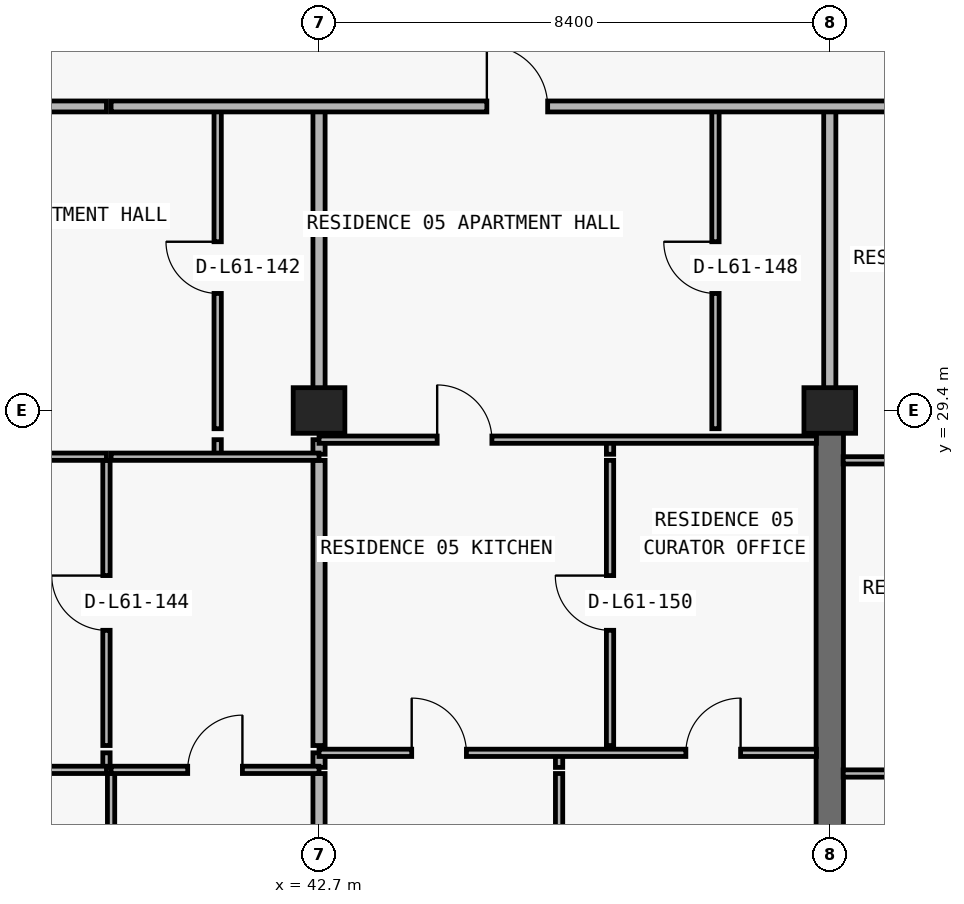
"""IFC4 building model, lengths in metres.
Left out: names, types, materials, properties, quantities, classifications, styles, units other than length and angle.
Written with IfcOpenShell. Run it as: python <this file> out.ifc"""

import sys

from ifc_helpers import new_model, si_unit, direction, frame, frame_2d, origin, origin_2d, place, context, subcontext, project, spatial, rectangle, extrude, element, fill, save


model = new_model("IFC4")
c1 = context("Model", 3, precision=1e-05, world=origin(), true_north=direction((0.0, 1.0)))
c2 = subcontext(c1, "Body", "Model", "MODEL_VIEW")
j1 = project(units=[si_unit("LENGTHUNIT", "METRE"), si_unit("PLANEANGLEUNIT", "RADIAN")], contexts=[c1])
p1 = place(None, origin())
s1 = spatial("IfcSite", under=j1, at=p1, CompositionType="ELEMENT")
p2 = place(p1, origin())
s2 = spatial("IfcBuilding", under=s1, at=p2, CompositionType="ELEMENT")
p3 = place(p2, frame((0.0, 0.0, 218.1)))
s3 = spatial("IfcBuildingStorey", under=s2, at=p3, CompositionType="ELEMENT", Elevation=218.1)
for number, where, z_axis, x_axis in (
    (1, (42.7, 29.4, 0.0), (0.0, 0.0, 1.0), (1.0, 0.0, 0.0)),
    (2, (51.1, 29.4, 0.0), (0.0, 0.0, 1.0), (1.0, 0.0, 0.0)),
):
    element("IfcColumn", number, at=place(p3, frame(where, z_axis=z_axis, x_axis=x_axis)), inside=s3, PredefinedType="COLUMN", context=c2, shape_type="SweptSolid", body=[
        extrude(rectangle(XDim=0.85, YDim=0.75, at=origin_2d()), origin(), (0.0, 0.0, 1.0), 3.0),
    ])
p4 = place(p3, frame((51.1, 20.8, 0.0), z_axis=(0.0, 0.0, 1.0), x_axis=(0.0, 1.0, 0.0)))
e3 = element("IfcWall", 3, at=p4, inside=s3, PredefinedType="SHEAR", context=c2, shape_type="SweptSolid", body=[
    extrude(rectangle(XDim=8.6, YDim=0.45, at=frame_2d((4.3, 0.0))), origin(), (0.0, 0.0, 1.0), 3.0),
])
p5 = place(p3, frame((39.204, 23.53, 0.0), z_axis=(0.0, 0.0, 1.0), x_axis=(0.0, 1.0, 0.0)))
e4 = element("IfcWall", 4, at=p5, inside=s3, PredefinedType="PARTITIONING", context=c2, shape_type="SweptSolid", body=[
    extrude(rectangle(XDim=0.24, YDim=0.12, at=frame_2d((0.12, 0.0))), origin(), (0.0, 0.0, 1.0), 3.0),
])
p6 = place(p3, frame((39.204, 23.89, 0.0), z_axis=(0.0, 0.0, 1.0), x_axis=(0.0, 1.0, 0.0)))
e5 = element("IfcWall", 5, at=p6, inside=s3, PredefinedType="PARTITIONING", context=c2, shape_type="SweptSolid", body=[
    extrude(rectangle(XDim=4.69, YDim=0.12, at=frame_2d((2.345, 0.0))), origin(), (0.0, 0.0, 1.0), 3.0),
])
p7 = place(p6, frame((1.895, 0.0, 0.0)))
e6 = element("IfcOpeningElement", 6, at=p7, cuts=e5, PredefinedType="OPENING", context=c2, shape_type="SweptSolid", body=[
    extrude(rectangle(XDim=0.9, YDim=2.15, at=frame_2d((0.45, 1.075))), frame((0.0, 0.07, 0.0), z_axis=(0.0, -1.0, 0.0), x_axis=(1.0, 0.0, 0.0)), (0.0, 0.0, 1.0), 0.14),
])
p8 = place(p3, frame((39.28, 11.24, 0.0), z_axis=(0.0, 0.0, 1.0), x_axis=(0.0, 1.0, 0.0)))
e7 = element("IfcWall", 7, at=p8, inside=s3, PredefinedType="PARTITIONING", context=c2, shape_type="SweptSolid", body=[
    extrude(rectangle(XDim=12.19, YDim=0.12, at=frame_2d((6.095, 0.0))), origin(), (0.0, 0.0, 1.0), 3.0),
])
p9 = place(p3, frame((41.033, 28.68, 0.0), z_axis=(0.0, 0.0, 1.0), x_axis=(0.0, 1.0, 0.0)))
e8 = element("IfcWall", 8, at=p9, inside=s3, PredefinedType="PARTITIONING", context=c2, shape_type="SweptSolid", body=[
    extrude(rectangle(XDim=0.24, YDim=0.12, at=frame_2d((0.12, 0.0))), origin(), (0.0, 0.0, 1.0), 2.675),
])
p10 = place(p3, frame((41.033, 29.1, 0.0), z_axis=(0.0, 0.0, 1.0), x_axis=(0.0, 1.0, 0.0)))
e9 = element("IfcWall", 9, at=p10, inside=s3, PredefinedType="PARTITIONING", context=c2, shape_type="SweptSolid", body=[
    extrude(rectangle(XDim=5.3, YDim=0.12, at=frame_2d((2.65, 0.0))), origin(), (0.0, 0.0, 1.0), 2.675),
])
p11 = place(p10, frame((2.225, 0.0, 0.0)))
e10 = element("IfcOpeningElement", 10, at=p11, cuts=e9, PredefinedType="OPENING", context=c2, shape_type="SweptSolid", body=[
    extrude(rectangle(XDim=0.85, YDim=2.1, at=frame_2d((0.425, 1.05))), frame((0.0, 0.07, 0.0), z_axis=(0.0, -1.0, 0.0), x_axis=(1.0, 0.0, 0.0)), (0.0, 0.0, 1.0), 0.14),
])
p12 = place(p3, frame((42.7, 11.24, 0.0), z_axis=(0.0, 0.0, 1.0), x_axis=(0.0, 1.0, 0.0)))
e11 = element("IfcWall", 11, at=p12, inside=s3, PredefinedType="PARTITIONING", context=c2, shape_type="SweptSolid", body=[
    extrude(rectangle(XDim=12.19, YDim=0.2, at=frame_2d((6.095, 0.0))), origin(), (0.0, 0.0, 1.0), 2.213),
])
p13 = place(p3, frame((42.7, 23.53, 0.0), z_axis=(0.0, 0.0, 1.0), x_axis=(0.0, 1.0, 0.0)))
e12 = element("IfcWall", 12, at=p13, inside=s3, PredefinedType="PARTITIONING", context=c2, shape_type="SweptSolid", body=[
    extrude(rectangle(XDim=0.24, YDim=0.2, at=frame_2d((0.12, 0.0))), origin(), (0.0, 0.0, 1.0), 2.213),
])
p14 = place(p3, frame((42.7, 23.89, 0.0), z_axis=(0.0, 0.0, 1.0), x_axis=(0.0, 1.0, 0.0)))
e13 = element("IfcWall", 13, at=p14, inside=s3, PredefinedType="PARTITIONING", context=c2, shape_type="SweptSolid", body=[
    extrude(rectangle(XDim=4.69, YDim=0.2, at=frame_2d((2.345, 0.0))), origin(), (0.0, 0.0, 1.0), 2.213),
])
p15 = place(p3, frame((42.7, 28.68, 0.0), z_axis=(0.0, 0.0, 1.0), x_axis=(0.0, 1.0, 0.0)))
e14 = element("IfcWall", 14, at=p15, inside=s3, PredefinedType="PARTITIONING", context=c2, shape_type="SweptSolid", body=[
    extrude(rectangle(XDim=0.24, YDim=0.2, at=frame_2d((0.12, 0.0))), origin(), (0.0, 0.0, 1.0), 2.213),
])
p16 = place(p3, frame((42.7, 29.1, 0.0), z_axis=(0.0, 0.0, 1.0), x_axis=(0.0, 1.0, 0.0)))
e15 = element("IfcWall", 15, at=p16, inside=s3, PredefinedType="PARTITIONING", context=c2, shape_type="SweptSolid", body=[
    extrude(rectangle(XDim=5.3, YDim=0.2, at=frame_2d((2.65, 0.0))), origin(), (0.0, 0.0, 1.0), 2.213),
])
p17 = place(p3, frame((46.648, 11.24, 0.0), z_axis=(0.0, 0.0, 1.0), x_axis=(0.0, 1.0, 0.0)))
e16 = element("IfcWall", 16, at=p17, inside=s3, PredefinedType="PARTITIONING", context=c2, shape_type="SweptSolid", body=[
    extrude(rectangle(XDim=12.19, YDim=0.12, at=frame_2d((6.095, 0.0))), origin(), (0.0, 0.0, 1.0), 3.0),
])
p18 = place(p3, frame((46.648, 23.53, 0.0), z_axis=(0.0, 0.0, 1.0), x_axis=(0.0, 1.0, 0.0)))
e17 = element("IfcWall", 17, at=p18, inside=s3, PredefinedType="PARTITIONING", context=c2, shape_type="SweptSolid", body=[
    extrude(rectangle(XDim=0.24, YDim=0.12, at=frame_2d((0.12, 0.0))), origin(), (0.0, 0.0, 1.0), 3.0),
])
p19 = place(p3, frame((47.486, 23.89, 0.0), z_axis=(0.0, 0.0, 1.0), x_axis=(0.0, 1.0, 0.0)))
e18 = element("IfcWall", 18, at=p19, inside=s3, PredefinedType="PARTITIONING", context=c2, shape_type="SweptSolid", body=[
    extrude(rectangle(XDim=4.69, YDim=0.12, at=frame_2d((2.345, 0.0))), origin(), (0.0, 0.0, 1.0), 3.0),
])
p20 = place(p19, frame((1.895, 0.0, 0.0)))
e19 = element("IfcOpeningElement", 19, at=p20, cuts=e18, PredefinedType="OPENING", context=c2, shape_type="SweptSolid", body=[
    extrude(rectangle(XDim=0.9, YDim=2.15, at=frame_2d((0.45, 1.075))), frame((0.0, 0.07, 0.0), z_axis=(0.0, -1.0, 0.0), x_axis=(1.0, 0.0, 0.0)), (0.0, 0.0, 1.0), 0.14),
])
p21 = place(p3, frame((47.486, 28.68, 0.0), z_axis=(0.0, 0.0, 1.0), x_axis=(0.0, 1.0, 0.0)))
e20 = element("IfcWall", 20, at=p21, inside=s3, PredefinedType="PARTITIONING", context=c2, shape_type="SweptSolid", body=[
    extrude(rectangle(XDim=0.24, YDim=0.12, at=frame_2d((0.12, 0.0))), origin(), (0.0, 0.0, 1.0), 3.0),
])
p22 = place(p3, frame((49.22, 29.1, 0.0), z_axis=(0.0, 0.0, 1.0), x_axis=(0.0, 1.0, 0.0)))
e21 = element("IfcWall", 21, at=p22, inside=s3, PredefinedType="PARTITIONING", context=c2, shape_type="SweptSolid", body=[
    extrude(rectangle(XDim=5.3, YDim=0.12, at=frame_2d((2.65, 0.0))), origin(), (0.0, 0.0, 1.0), 2.675),
])
p23 = place(p22, frame((2.225, 0.0, 0.0)))
e22 = element("IfcOpeningElement", 22, at=p23, cuts=e21, PredefinedType="OPENING", context=c2, shape_type="SweptSolid", body=[
    extrude(rectangle(XDim=0.85, YDim=2.1, at=frame_2d((0.425, 1.05))), frame((0.0, 0.07, 0.0), z_axis=(0.0, -1.0, 0.0), x_axis=(1.0, 0.0, 0.0)), (0.0, 0.0, 1.0), 0.14),
])
p24 = place(p3, frame((51.1, 29.405, 0.0), z_axis=(0.0, 0.0, 1.0), x_axis=(0.0, 1.0, 0.0)))
e23 = element("IfcWall", 23, at=p24, inside=s3, PredefinedType="PARTITIONING", context=c2, shape_type="SweptSolid", body=[
    extrude(rectangle(XDim=4.995, YDim=0.2, at=frame_2d((2.498, 0.0))), origin(), (0.0, 0.0, 1.0), 2.285),
])
p25 = place(p3, frame((51.32, 23.43, 0.0), z_axis=(0.0, 0.0, 1.0), x_axis=(1.0, 0.0, 0.0)))
e24 = element("IfcWall", 24, at=p25, inside=s3, PredefinedType="PARTITIONING", context=c2, shape_type="SweptSolid", body=[
    extrude(rectangle(XDim=8.18, YDim=0.12, at=frame_2d((4.09, 0.0))), origin(), (0.0, 0.0, 1.0), 3.0),
])
p26 = place(p25, frame((1.583, 0.0, 0.0)))
e25 = element("IfcOpeningElement", 25, at=p26, cuts=e24, PredefinedType="OPENING", context=c2, shape_type="SweptSolid", body=[
    extrude(rectangle(XDim=0.9, YDim=2.15, at=frame_2d((0.45, 1.075))), frame((0.0, 0.07, 0.0), z_axis=(0.0, -1.0, 0.0), x_axis=(1.0, 0.0, 0.0)), (0.0, 0.0, 1.0), 0.14),
])
p27 = place(p25, frame((5.84, 0.0, 0.0)))
e26 = element("IfcOpeningElement", 26, at=p27, cuts=e24, PredefinedType="OPENING", context=c2, shape_type="SweptSolid", body=[
    extrude(rectangle(XDim=0.9, YDim=2.15, at=frame_2d((0.45, 1.075))), frame((0.0, 0.07, 0.0), z_axis=(0.0, -1.0, 0.0), x_axis=(1.0, 0.0, 0.0)), (0.0, 0.0, 1.0), 0.14),
])
p28 = place(p3, frame((35.1, 23.49, 0.0), z_axis=(0.0, 0.0, 1.0), x_axis=(1.0, 0.0, 0.0)))
e27 = element("IfcWall", 27, at=p28, inside=s3, PredefinedType="PARTITIONING", context=c2, shape_type="SweptSolid", body=[
    extrude(rectangle(XDim=4.104, YDim=0.12, at=frame_2d((2.052, 0.0))), origin(), (0.0, 0.0, 1.0), 3.0),
])
p29 = place(p28, frame((1.602, 0.0, 0.0)))
e28 = element("IfcOpeningElement", 28, at=p29, cuts=e27, PredefinedType="OPENING", context=c2, shape_type="SweptSolid", body=[
    extrude(rectangle(XDim=0.9, YDim=2.15, at=frame_2d((0.45, 1.075))), frame((0.0, 0.07, 0.0), z_axis=(0.0, -1.0, 0.0), x_axis=(1.0, 0.0, 0.0)), (0.0, 0.0, 1.0), 0.14),
])
p30 = place(p3, frame((39.28, 23.49, 0.0), z_axis=(0.0, 0.0, 1.0), x_axis=(1.0, 0.0, 0.0)))
e29 = element("IfcWall", 29, at=p30, inside=s3, PredefinedType="PARTITIONING", context=c2, shape_type="SweptSolid", body=[
    extrude(rectangle(XDim=3.42, YDim=0.12, at=frame_2d((1.71, 0.0))), origin(), (0.0, 0.0, 1.0), 3.0),
])
p31 = place(p30, frame((1.26, 0.0, 0.0)))
e30 = element("IfcOpeningElement", 30, at=p31, cuts=e29, PredefinedType="OPENING", context=c2, shape_type="SweptSolid", body=[
    extrude(rectangle(XDim=0.9, YDim=2.15, at=frame_2d((0.45, 1.075))), frame((0.0, 0.07, 0.0), z_axis=(0.0, -1.0, 0.0), x_axis=(1.0, 0.0, 0.0)), (0.0, 0.0, 1.0), 0.14),
])
p32 = place(p3, frame((42.7, 23.77, 0.0), z_axis=(0.0, 0.0, 1.0), x_axis=(1.0, 0.0, 0.0)))
e31 = element("IfcWall", 31, at=p32, inside=s3, PredefinedType="PARTITIONING", context=c2, shape_type="SweptSolid", body=[
    extrude(rectangle(XDim=8.18, YDim=0.12, at=frame_2d((4.09, 0.0))), origin(), (0.0, 0.0, 1.0), 3.0),
])
p33 = place(p32, frame((1.524, 0.0, 0.0)))
e32 = element("IfcOpeningElement", 32, at=p33, cuts=e31, PredefinedType="OPENING", context=c2, shape_type="SweptSolid", body=[
    extrude(rectangle(XDim=0.9, YDim=2.15, at=frame_2d((0.45, 1.075))), frame((0.0, 0.07, 0.0), z_axis=(0.0, -1.0, 0.0), x_axis=(1.0, 0.0, 0.0)), (0.0, 0.0, 1.0), 0.14),
])
p34 = place(p32, frame((6.033, 0.0, 0.0)))
e33 = element("IfcOpeningElement", 33, at=p34, cuts=e31, PredefinedType="OPENING", context=c2, shape_type="SweptSolid", body=[
    extrude(rectangle(XDim=0.9, YDim=2.15, at=frame_2d((0.45, 1.075))), frame((0.0, 0.07, 0.0), z_axis=(0.0, -1.0, 0.0), x_axis=(1.0, 0.0, 0.0)), (0.0, 0.0, 1.0), 0.14),
])
p35 = place(p3, frame((51.32, 28.58, 0.0), z_axis=(0.0, 0.0, 1.0), x_axis=(1.0, 0.0, 0.0)))
e34 = element("IfcWall", 34, at=p35, inside=s3, PredefinedType="PARTITIONING", context=c2, shape_type="SweptSolid", body=[
    extrude(rectangle(XDim=8.18, YDim=0.12, at=frame_2d((4.09, 0.0))), origin(), (0.0, 0.0, 1.0), 3.0),
])
p36 = place(p35, frame((1.583, 0.0, 0.0)))
e35 = element("IfcOpeningElement", 35, at=p36, cuts=e34, PredefinedType="OPENING", context=c2, shape_type="SweptSolid", body=[
    extrude(rectangle(XDim=0.9, YDim=2.15, at=frame_2d((0.45, 1.075))), frame((0.0, 0.07, 0.0), z_axis=(0.0, -1.0, 0.0), x_axis=(1.0, 0.0, 0.0)), (0.0, 0.0, 1.0), 0.14),
])
p37 = place(p3, frame((35.1, 28.64, 0.0), z_axis=(0.0, 0.0, 1.0), x_axis=(1.0, 0.0, 0.0)))
e36 = element("IfcWall", 36, at=p37, inside=s3, PredefinedType="PARTITIONING", context=c2, shape_type="SweptSolid", body=[
    extrude(rectangle(XDim=4.104, YDim=0.12, at=frame_2d((2.052, 0.0))), origin(), (0.0, 0.0, 1.0), 3.0),
])
p38 = place(p37, frame((1.602, 0.0, 0.0)))
e37 = element("IfcOpeningElement", 37, at=p38, cuts=e36, PredefinedType="OPENING", context=c2, shape_type="SweptSolid", body=[
    extrude(rectangle(XDim=0.9, YDim=2.15, at=frame_2d((0.45, 1.075))), frame((0.0, 0.07, 0.0), z_axis=(0.0, -1.0, 0.0), x_axis=(1.0, 0.0, 0.0)), (0.0, 0.0, 1.0), 0.14),
])
p39 = place(p3, frame((39.28, 28.64, 0.0), z_axis=(0.0, 0.0, 1.0), x_axis=(1.0, 0.0, 0.0)))
e38 = element("IfcWall", 38, at=p39, inside=s3, PredefinedType="PARTITIONING", context=c2, shape_type="SweptSolid", body=[
    extrude(rectangle(XDim=3.42, YDim=0.12, at=frame_2d((1.71, 0.0))), origin(), (0.0, 0.0, 1.0), 3.0),
])
p40 = place(p3, frame((42.7, 28.92, 0.0), z_axis=(0.0, 0.0, 1.0), x_axis=(1.0, 0.0, 0.0)))
e39 = element("IfcWall", 39, at=p40, inside=s3, PredefinedType="PARTITIONING", context=c2, shape_type="SweptSolid", body=[
    extrude(rectangle(XDim=8.18, YDim=0.12, at=frame_2d((4.09, 0.0))), origin(), (0.0, 0.0, 1.0), 3.0),
])
p41 = place(p40, frame((1.943, 0.0, 0.0)))
e40 = element("IfcOpeningElement", 40, at=p41, cuts=e39, PredefinedType="OPENING", context=c2, shape_type="SweptSolid", body=[
    extrude(rectangle(XDim=0.9, YDim=2.15, at=frame_2d((0.45, 1.075))), frame((0.0, 0.07, 0.0), z_axis=(0.0, -1.0, 0.0), x_axis=(1.0, 0.0, 0.0)), (0.0, 0.0, 1.0), 0.14),
])
p42 = place(p3, frame((10.105, 34.4, 0.0), z_axis=(0.0, 0.0, 1.0), x_axis=(1.0, 0.0, 0.0)))
e41 = element("IfcWall", 41, at=p42, inside=s3, PredefinedType="PARTITIONING", context=c2, shape_type="SweptSolid", body=[
    extrude(rectangle(XDim=29.099, YDim=0.18, at=frame_2d((14.55, 0.0))), origin(), (0.0, 0.0, 1.0), 3.0),
])
p43 = place(p42, frame((2.647, 0.0, 0.0)))
e42 = element("IfcOpeningElement", 42, at=p43, cuts=e41, PredefinedType="OPENING", context=c2, shape_type="SweptSolid", body=[
    extrude(rectangle(XDim=1.0, YDim=2.2, at=frame_2d((0.5, 1.1))), frame((0.0, 0.1, 0.0), z_axis=(0.0, -1.0, 0.0), x_axis=(1.0, 0.0, 0.0)), (0.0, 0.0, 1.0), 0.2),
])
p44 = place(p42, frame((11.056, 0.0, 0.0)))
e43 = element("IfcOpeningElement", 43, at=p44, cuts=e41, PredefinedType="OPENING", context=c2, shape_type="SweptSolid", body=[
    extrude(rectangle(XDim=1.0, YDim=2.2, at=frame_2d((0.5, 1.1))), frame((0.0, 0.1, 0.0), z_axis=(0.0, -1.0, 0.0), x_axis=(1.0, 0.0, 0.0)), (0.0, 0.0, 1.0), 0.2),
])
p45 = place(p42, frame((19.334, 0.0, 0.0)))
e44 = element("IfcOpeningElement", 44, at=p45, cuts=e41, PredefinedType="OPENING", context=c2, shape_type="SweptSolid", body=[
    extrude(rectangle(XDim=1.0, YDim=2.2, at=frame_2d((0.5, 1.1))), frame((0.0, 0.1, 0.0), z_axis=(0.0, -1.0, 0.0), x_axis=(1.0, 0.0, 0.0)), (0.0, 0.0, 1.0), 0.2),
])
p46 = place(p42, frame((26.547, 0.0, 0.0)))
e45 = element("IfcOpeningElement", 45, at=p46, cuts=e41, PredefinedType="OPENING", context=c2, shape_type="SweptSolid", body=[
    extrude(rectangle(XDim=1.0, YDim=2.2, at=frame_2d((0.5, 1.1))), frame((0.0, 0.1, 0.0), z_axis=(0.0, -1.0, 0.0), x_axis=(1.0, 0.0, 0.0)), (0.0, 0.0, 1.0), 0.2),
])
p47 = place(p3, frame((39.28, 34.4, 0.0), z_axis=(0.0, 0.0, 1.0), x_axis=(1.0, 0.0, 0.0)))
e46 = element("IfcWall", 46, at=p47, inside=s3, PredefinedType="PARTITIONING", context=c2, shape_type="SweptSolid", body=[
    extrude(rectangle(XDim=28.42, YDim=0.18, at=frame_2d((14.21, 0.0))), origin(), (0.0, 0.0, 1.0), 3.0),
])
p48 = place(p47, frame((6.18, 0.0, 0.0)))
e47 = element("IfcOpeningElement", 47, at=p48, cuts=e46, PredefinedType="OPENING", context=c2, shape_type="SweptSolid", body=[
    extrude(rectangle(XDim=1.0, YDim=2.2, at=frame_2d((0.5, 1.1))), frame((0.0, 0.1, 0.0), z_axis=(0.0, -1.0, 0.0), x_axis=(1.0, 0.0, 0.0)), (0.0, 0.0, 1.0), 0.2),
])
p49 = place(p47, frame((14.695, 0.0, 0.0)))
e48 = element("IfcOpeningElement", 48, at=p49, cuts=e46, PredefinedType="OPENING", context=c2, shape_type="SweptSolid", body=[
    extrude(rectangle(XDim=1.0, YDim=2.2, at=frame_2d((0.5, 1.1))), frame((0.0, 0.1, 0.0), z_axis=(0.0, -1.0, 0.0), x_axis=(1.0, 0.0, 0.0)), (0.0, 0.0, 1.0), 0.2),
])
p50 = place(p47, frame((22.87, 0.0, 0.0)))
e49 = element("IfcOpeningElement", 49, at=p50, cuts=e46, PredefinedType="OPENING", context=c2, shape_type="SweptSolid", body=[
    extrude(rectangle(XDim=1.0, YDim=2.2, at=frame_2d((0.5, 1.1))), frame((0.0, 0.1, 0.0), z_axis=(0.0, -1.0, 0.0), x_axis=(1.0, 0.0, 0.0)), (0.0, 0.0, 1.0), 0.2),
])
p51 = place(p11, origin())
e50 = element("IfcDoor", 50, at=p51, inside=s3, OperationType="SINGLE_SWING_RIGHT", PredefinedType="DOOR", context=c2, shape_type="SweptSolid", body=[
    extrude(rectangle(XDim=0.85, YDim=2.1, at=frame_2d((0.425, 1.05))), frame((0.0, 0.025, 0.0), z_axis=(0.0, -1.0, 0.0), x_axis=(1.0, 0.0, 0.0)), (0.0, 0.0, 1.0), 0.05),
])
fill(e10, e50)
p52 = place(p7, origin())
e51 = element("IfcDoor", 51, at=p52, inside=s3, OperationType="SINGLE_SWING_RIGHT", PredefinedType="DOOR", context=c2, shape_type="SweptSolid", body=[
    extrude(rectangle(XDim=0.9, YDim=2.15, at=frame_2d((0.45, 1.075))), frame((0.0, 0.025, 0.0), z_axis=(0.0, -1.0, 0.0), x_axis=(1.0, 0.0, 0.0)), (0.0, 0.0, 1.0), 0.05),
])
fill(e6, e51)
p53 = place(p31, origin())
e52 = element("IfcDoor", 52, at=p53, inside=s3, OperationType="SINGLE_SWING_RIGHT", PredefinedType="DOOR", context=c2, shape_type="SweptSolid", body=[
    extrude(rectangle(XDim=0.9, YDim=2.15, at=frame_2d((0.45, 1.075))), frame((0.0, 0.025, 0.0), z_axis=(0.0, -1.0, 0.0), x_axis=(1.0, 0.0, 0.0)), (0.0, 0.0, 1.0), 0.05),
])
fill(e30, e52)
p54 = place(p48, origin())
e53 = element("IfcDoor", 53, at=p54, inside=s3, OperationType="SINGLE_SWING_LEFT", PredefinedType="DOOR", context=c2, shape_type="SweptSolid", body=[
    extrude(rectangle(XDim=1.0, YDim=2.2, at=frame_2d((0.5, 1.1))), frame((0.0, 0.025, 0.0), z_axis=(0.0, -1.0, 0.0), x_axis=(1.0, 0.0, 0.0)), (0.0, 0.0, 1.0), 0.05),
])
fill(e47, e53)
p55 = place(p23, origin())
e54 = element("IfcDoor", 54, at=p55, inside=s3, OperationType="SINGLE_SWING_RIGHT", PredefinedType="DOOR", context=c2, shape_type="SweptSolid", body=[
    extrude(rectangle(XDim=0.85, YDim=2.1, at=frame_2d((0.425, 1.05))), frame((0.0, 0.025, 0.0), z_axis=(0.0, -1.0, 0.0), x_axis=(1.0, 0.0, 0.0)), (0.0, 0.0, 1.0), 0.05),
])
fill(e22, e54)
p56 = place(p41, origin())
e55 = element("IfcDoor", 55, at=p56, inside=s3, OperationType="SINGLE_SWING_LEFT", PredefinedType="DOOR", context=c2, shape_type="SweptSolid", body=[
    extrude(rectangle(XDim=0.9, YDim=2.15, at=frame_2d((0.45, 1.075))), frame((0.0, 0.025, 0.0), z_axis=(0.0, -1.0, 0.0), x_axis=(1.0, 0.0, 0.0)), (0.0, 0.0, 1.0), 0.05),
])
fill(e40, e55)
p57 = place(p20, origin())
e56 = element("IfcDoor", 56, at=p57, inside=s3, OperationType="SINGLE_SWING_RIGHT", PredefinedType="DOOR", context=c2, shape_type="SweptSolid", body=[
    extrude(rectangle(XDim=0.9, YDim=2.15, at=frame_2d((0.45, 1.075))), frame((0.0, 0.025, 0.0), z_axis=(0.0, -1.0, 0.0), x_axis=(1.0, 0.0, 0.0)), (0.0, 0.0, 1.0), 0.05),
])
fill(e19, e56)
p58 = place(p33, origin())
e57 = element("IfcDoor", 57, at=p58, inside=s3, OperationType="SINGLE_SWING_LEFT", PredefinedType="DOOR", context=c2, shape_type="SweptSolid", body=[
    extrude(rectangle(XDim=0.9, YDim=2.15, at=frame_2d((0.45, 1.075))), frame((0.0, 0.025, 0.0), z_axis=(0.0, -1.0, 0.0), x_axis=(1.0, 0.0, 0.0)), (0.0, 0.0, 1.0), 0.05),
])
fill(e32, e57)
p59 = place(p34, origin())
e58 = element("IfcDoor", 58, at=p59, inside=s3, OperationType="SINGLE_SWING_RIGHT", PredefinedType="DOOR", context=c2, shape_type="SweptSolid", body=[
    extrude(rectangle(XDim=0.9, YDim=2.15, at=frame_2d((0.45, 1.075))), frame((0.0, 0.025, 0.0), z_axis=(0.0, -1.0, 0.0), x_axis=(1.0, 0.0, 0.0)), (0.0, 0.0, 1.0), 0.05),
])
fill(e33, e58)
save(model, sys.argv[1])
